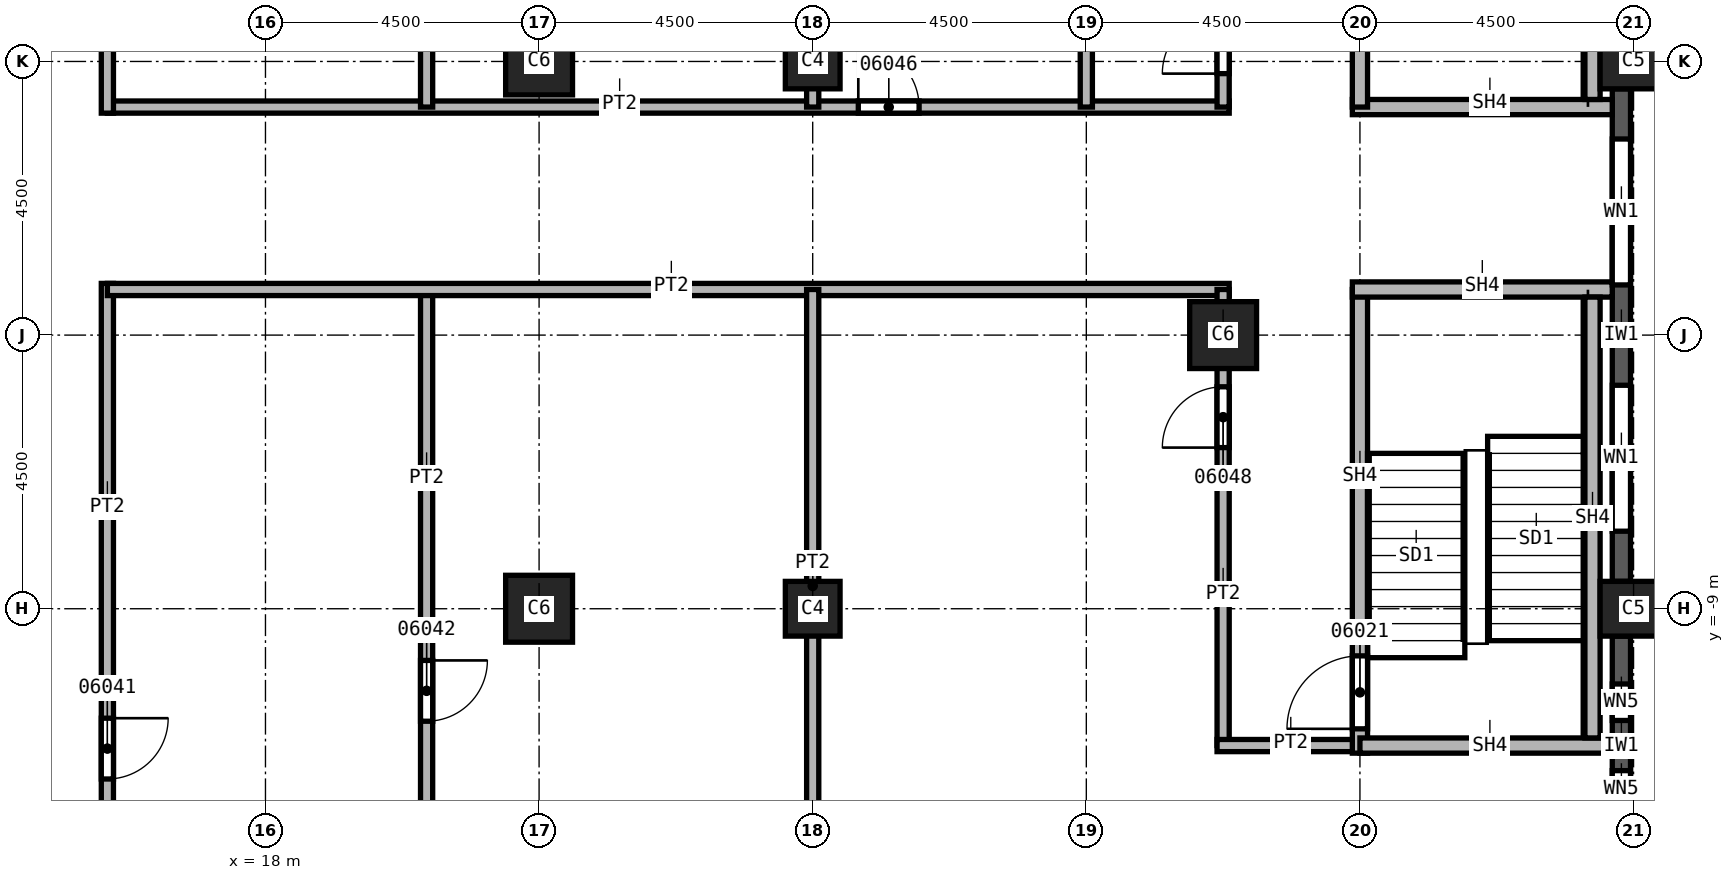
"""IFC4 building model, lengths in metres.
Left out: names, types, materials, properties, quantities, classifications, styles, units other than length and angle.
Written with IfcOpenShell. Run it as: python <this file> out.ifc"""

import sys

from ifc_helpers import new_model, si_unit, direction, frame, frame_2d, origin, origin_2d, place, context, subcontext, project, spatial, rectangle, extrude, element, fill, save


model = new_model("IFC4")
c1 = context("Model", 3, precision=1e-05, world=origin(), true_north=direction((0.0, 1.0)))
c2 = subcontext(c1, "Body", "Model", "MODEL_VIEW")
j1 = project(units=[si_unit("LENGTHUNIT", "METRE"), si_unit("PLANEANGLEUNIT", "RADIAN")], contexts=[c1])
p1 = place(None, origin())
s1 = spatial("IfcSite", under=j1, at=p1, CompositionType="ELEMENT")
p2 = place(p1, origin())
s2 = spatial("IfcBuilding", under=s1, at=p2, CompositionType="ELEMENT")
p3 = place(p2, frame((0.0, 0.0, 130.0)))
s3 = spatial("IfcBuildingStorey", under=s2, at=p3, CompositionType="ELEMENT", Elevation=130.0)
for number, where, z_axis, x_axis in (
    (1, (40.5, 0.0, 0.0), (0.0, 0.0, 1.0), (0.0, 1.0, 0.0)),
    (2, (40.5, -9.0, 0.0), (0.0, 0.0, 1.0), (0.0, 1.0, 0.0)),
):
    element("IfcColumn", number, at=place(p3, frame(where, z_axis=z_axis, x_axis=x_axis)), inside=s3, PredefinedType="COLUMN", context=c2, shape_type="SweptSolid", body=[
        extrude(rectangle(XDim=0.9, YDim=1.1, at=origin_2d()), origin(), (0.0, 0.0, 1.0), 3.7),
    ])
for number, where, z_axis, x_axis in (
    (3, (33.75, -4.5, 0.0), (0.0, 0.0, 1.0), (1.0, 0.0, 0.0)),
    (4, (22.5, 0.0, 0.0), (0.0, 0.0, 1.0), (1.0, 0.0, 0.0)),
    (5, (22.5, -9.0, 0.0), (0.0, 0.0, 1.0), (1.0, 0.0, 0.0)),
):
    element("IfcColumn", number, at=place(p3, frame(where, z_axis=z_axis, x_axis=x_axis)), inside=s3, PredefinedType="COLUMN", context=c2, shape_type="SweptSolid", body=[
        extrude(rectangle(XDim=1.1, YDim=1.1, at=origin_2d()), origin(), (0.0, 0.0, 1.0), 3.7),
    ])
for number, where, z_axis, x_axis in (
    (6, (27.0, 0.0, 0.0), (0.0, 0.0, 1.0), (1.0, 0.0, 0.0)),
    (7, (27.0, -9.0, 0.0), (0.0, 0.0, 1.0), (1.0, 0.0, 0.0)),
):
    element("IfcColumn", number, at=place(p3, frame(where, z_axis=z_axis, x_axis=x_axis)), inside=s3, PredefinedType="COLUMN", context=c2, shape_type="SweptSolid", body=[
        extrude(rectangle(XDim=0.9, YDim=0.9, at=origin_2d()), origin(), (0.0, 0.0, 1.0), 3.7),
    ])
p4 = place(p3, frame((40.3, -13.05, 0.0), z_axis=(0.0, 0.0, 1.0), x_axis=(0.0, 1.0, 0.0)))
e8 = element("IfcWall", 8, at=p4, inside=s3, PredefinedType="SOLIDWALL", context=c2, shape_type="SweptSolid", body=[
    extrude(rectangle(XDim=3.6, YDim=0.3, at=frame_2d((1.8, 0.0))), origin(), (0.0, 0.0, 1.0), 3.1),
])
p5 = place(p4, frame((0.788, 0.0, 0.8)))
e9 = element("IfcOpeningElement", 9, at=p5, cuts=e8, PredefinedType="OPENING", context=c2, shape_type="SweptSolid", body=[
    extrude(rectangle(XDim=0.6, YDim=1.95, at=frame_2d((0.3, 0.975))), frame((0.0, 0.15, 0.0), z_axis=(0.0, -1.0, 0.0), x_axis=(1.0, 0.0, 0.0)), (0.0, 0.0, 1.0), 0.3),
])
p6 = place(p4, frame((2.212, 0.0, 0.8)))
e10 = element("IfcOpeningElement", 10, at=p6, cuts=e8, PredefinedType="OPENING", context=c2, shape_type="SweptSolid", body=[
    extrude(rectangle(XDim=0.6, YDim=1.95, at=frame_2d((0.3, 0.975))), frame((0.0, 0.15, 0.0), z_axis=(0.0, -1.0, 0.0), x_axis=(1.0, 0.0, 0.0)), (0.0, 0.0, 1.0), 0.3),
])
p7 = place(p3, frame((40.3, -8.55, 0.0), z_axis=(0.0, 0.0, 1.0), x_axis=(0.0, 1.0, 0.0)))
e11 = element("IfcWall", 11, at=p7, inside=s3, PredefinedType="SOLIDWALL", context=c2, shape_type="SweptSolid", body=[
    extrude(rectangle(XDim=8.1, YDim=0.3, at=frame_2d((4.05, 0.0))), origin(), (0.0, 0.0, 1.0), 3.1),
])
p8 = place(p7, frame((0.825, 0.0, 0.8)))
e12 = element("IfcOpeningElement", 12, at=p8, cuts=e11, PredefinedType="OPENING", context=c2, shape_type="SweptSolid", body=[
    extrude(rectangle(XDim=2.4, YDim=1.95, at=frame_2d((1.2, 0.975))), frame((0.0, 0.15, 0.0), z_axis=(0.0, -1.0, 0.0), x_axis=(1.0, 0.0, 0.0)), (0.0, 0.0, 1.0), 0.3),
])
p9 = place(p7, frame((4.875, 0.0, 0.8)))
e13 = element("IfcOpeningElement", 13, at=p9, cuts=e11, PredefinedType="OPENING", context=c2, shape_type="SweptSolid", body=[
    extrude(rectangle(XDim=2.4, YDim=1.95, at=frame_2d((1.2, 0.975))), frame((0.0, 0.15, 0.0), z_axis=(0.0, -1.0, 0.0), x_axis=(1.0, 0.0, 0.0)), (0.0, 0.0, 1.0), 0.3),
])
p10 = place(p3, frame((15.4, -3.65, 0.0), z_axis=(0.0, 0.0, 1.0), x_axis=(0.0, -1.0, 0.0)))
e14 = element("IfcWall", 14, at=p10, inside=s3, PredefinedType="PARTITIONING", context=c2, shape_type="SweptSolid", body=[
    extrude(rectangle(XDim=19.6, YDim=0.2, at=frame_2d((9.8, 0.0))), origin(), (0.0, 0.0, 1.0), 3.7),
])
p11 = place(p10, frame((14.65, 0.0, 0.0)))
e15 = element("IfcOpeningElement", 15, at=p11, cuts=e14, PredefinedType="OPENING", context=c2, shape_type="SweptSolid", body=[
    extrude(rectangle(XDim=1.0, YDim=2.1, at=frame_2d((0.5, 1.05))), frame((0.0, 0.1, 0.0), z_axis=(0.0, -1.0, 0.0), x_axis=(1.0, 0.0, 0.0)), (0.0, 0.0, 1.0), 0.2),
])
p12 = place(p10, frame((10.0, 0.0, 0.0)))
e16 = element("IfcOpeningElement", 16, at=p12, cuts=e14, PredefinedType="OPENING", context=c2, shape_type="SweptSolid", body=[
    extrude(rectangle(XDim=1.0, YDim=2.1, at=frame_2d((0.5, 1.05))), frame((0.0, 0.1, 0.0), z_axis=(0.0, -1.0, 0.0), x_axis=(1.0, 0.0, 0.0)), (0.0, 0.0, 1.0), 0.2),
])
p13 = place(p10, frame((7.15, 0.0, 0.0)))
e17 = element("IfcOpeningElement", 17, at=p13, cuts=e14, PredefinedType="OPENING", context=c2, shape_type="SweptSolid", body=[
    extrude(rectangle(XDim=1.0, YDim=2.1, at=frame_2d((0.5, 1.05))), frame((0.0, 0.1, 0.0), z_axis=(0.0, -1.0, 0.0), x_axis=(1.0, 0.0, 0.0)), (0.0, 0.0, 1.0), 0.2),
])
p14 = place(p3, frame((15.4, -0.75, 0.0), z_axis=(0.0, 0.0, 1.0), x_axis=(1.0, 0.0, 0.0)))
e18 = element("IfcWall", 18, at=p14, inside=s3, PredefinedType="PARTITIONING", context=c2, shape_type="SweptSolid", body=[
    extrude(rectangle(XDim=18.45, YDim=0.2, at=frame_2d((9.225, 0.0))), origin(), (0.0, 0.0, 1.0), 3.7),
])
p15 = place(p14, frame((12.35, 0.0, 0.0)))
e19 = element("IfcOpeningElement", 19, at=p15, cuts=e18, PredefinedType="OPENING", context=c2, shape_type="SweptSolid", body=[
    extrude(rectangle(XDim=1.0, YDim=2.1, at=frame_2d((0.5, 1.05))), frame((0.0, 0.1, 0.0), z_axis=(0.0, -1.0, 0.0), x_axis=(1.0, 0.0, 0.0)), (0.0, 0.0, 1.0), 0.2),
])
p16 = place(p3, frame((15.4, 23.25, 0.0), z_axis=(0.0, 0.0, 1.0), x_axis=(0.0, -1.0, 0.0)))
e20 = element("IfcWall", 20, at=p16, inside=s3, PredefinedType="PARTITIONING", context=c2, shape_type="SweptSolid", body=[
    extrude(rectangle(XDim=24.1, YDim=0.2, at=frame_2d((12.05, 0.0))), origin(), (0.0, 0.0, 1.0), 3.7),
])
p17 = place(p16, frame((21.3, 0.0, 0.0)))
e21 = element("IfcOpeningElement", 21, at=p17, cuts=e20, PredefinedType="OPENING", context=c2, shape_type="SweptSolid", body=[
    extrude(rectangle(XDim=1.0, YDim=2.1, at=frame_2d((0.5, 1.05))), frame((0.0, 0.1, 0.0), z_axis=(0.0, -1.0, 0.0), x_axis=(1.0, 0.0, 0.0)), (0.0, 0.0, 1.0), 0.2),
])
p18 = place(p16, frame((12.45, 0.0, 0.0)))
e22 = element("IfcOpeningElement", 22, at=p18, cuts=e20, PredefinedType="OPENING", context=c2, shape_type="SweptSolid", body=[
    extrude(rectangle(XDim=1.0, YDim=2.1, at=frame_2d((0.5, 1.05))), frame((0.0, 0.1, 0.0), z_axis=(0.0, -1.0, 0.0), x_axis=(1.0, 0.0, 0.0)), (0.0, 0.0, 1.0), 0.2),
])
p19 = place(p16, frame((4.45, 0.0, 0.0)))
e23 = element("IfcOpeningElement", 23, at=p19, cuts=e20, PredefinedType="OPENING", context=c2, shape_type="SweptSolid", body=[
    extrude(rectangle(XDim=1.0, YDim=2.1, at=frame_2d((0.5, 1.05))), frame((0.0, 0.1, 0.0), z_axis=(0.0, -1.0, 0.0), x_axis=(1.0, 0.0, 0.0)), (0.0, 0.0, 1.0), 0.2),
])
p20 = place(p3, frame((20.65, -3.75, 0.0), z_axis=(0.0, 0.0, 1.0), x_axis=(0.0, -1.0, 0.0)))
e24 = element("IfcWall", 24, at=p20, inside=s3, PredefinedType="PARTITIONING", context=c2, shape_type="SweptSolid", body=[
    extrude(rectangle(XDim=9.75, YDim=0.2, at=frame_2d((4.875, 0.0))), origin(), (0.0, 0.0, 1.0), 3.7),
])
p21 = place(p20, frame((6.1, 0.0, 0.0)))
e25 = element("IfcOpeningElement", 25, at=p21, cuts=e24, PredefinedType="OPENING", context=c2, shape_type="SweptSolid", body=[
    extrude(rectangle(XDim=1.0, YDim=2.1, at=frame_2d((0.5, 1.05))), frame((0.0, 0.1, 0.0), z_axis=(0.0, -1.0, 0.0), x_axis=(1.0, 0.0, 0.0)), (0.0, 0.0, 1.0), 0.2),
])
p22 = place(p3, frame((20.65, 9.1, 0.0), z_axis=(0.0, 0.0, 1.0), x_axis=(0.0, -1.0, 0.0)))
e26 = element("IfcWall", 26, at=p22, inside=s3, PredefinedType="PARTITIONING", context=c2, shape_type="SweptSolid", body=[
    extrude(rectangle(XDim=9.85, YDim=0.2, at=frame_2d((4.925, 0.0))), origin(), (0.0, 0.0, 1.0), 3.7),
])
p23 = place(p22, frame((6.25, 0.0, 0.0)))
e27 = element("IfcOpeningElement", 27, at=p23, cuts=e26, PredefinedType="OPENING", context=c2, shape_type="SweptSolid", body=[
    extrude(rectangle(XDim=1.0, YDim=2.1, at=frame_2d((0.5, 1.05))), frame((0.0, 0.1, 0.0), z_axis=(0.0, -1.0, 0.0), x_axis=(1.0, 0.0, 0.0)), (0.0, 0.0, 1.0), 0.2),
])
p24 = place(p3, frame((33.85, -3.75, 0.0), z_axis=(0.0, 0.0, 1.0), x_axis=(-1.0, 0.0, 0.0)))
e28 = element("IfcWall", 28, at=p24, inside=s3, PredefinedType="PARTITIONING", context=c2, shape_type="SweptSolid", body=[
    extrude(rectangle(XDim=18.45, YDim=0.2, at=frame_2d((9.225, 0.0))), origin(), (0.0, 0.0, 1.0), 3.7),
])
p25 = place(p3, frame((27.0, -3.75, 0.0), z_axis=(0.0, 0.0, 1.0), x_axis=(0.0, -1.0, 0.0)))
e29 = element("IfcWall", 29, at=p25, inside=s3, PredefinedType="PARTITIONING", context=c2, shape_type="SweptSolid", body=[
    extrude(rectangle(XDim=13.7, YDim=0.2, at=frame_2d((6.85, 0.0))), origin(), (0.0, 0.0, 1.0), 3.7),
])
for number, where, z_axis, x_axis in (
    (30, (27.0, 17.45, 0.0), (0.0, 0.0, 1.0), (0.0, -1.0, 0.0)),
    (31, (31.5, 17.45, 0.0), (0.0, 0.0, 1.0), (0.0, -1.0, 0.0)),
):
    element("IfcWall", number, at=place(p3, frame(where, z_axis=z_axis, x_axis=x_axis)), inside=s3, PredefinedType="PARTITIONING", context=c2, shape_type="SweptSolid", body=[
        extrude(rectangle(XDim=18.2, YDim=0.2, at=frame_2d((9.1, 0.0))), origin(), (0.0, 0.0, 1.0), 3.7),
    ])
p26 = place(p3, frame((33.75, -11.25, 0.0), z_axis=(0.0, 0.0, 1.0), x_axis=(0.0, 1.0, 0.0)))
e32 = element("IfcWall", 32, at=p26, inside=s3, PredefinedType="PARTITIONING", context=c2, shape_type="SweptSolid", body=[
    extrude(rectangle(XDim=7.5, YDim=0.2, at=frame_2d((3.75, 0.0))), origin(), (0.0, 0.0, 1.0), 3.7),
])
p27 = place(p26, frame((4.9, 0.0, 0.0)))
e33 = element("IfcOpeningElement", 33, at=p27, cuts=e32, PredefinedType="OPENING", context=c2, shape_type="SweptSolid", body=[
    extrude(rectangle(XDim=1.0, YDim=2.1, at=frame_2d((0.5, 1.05))), frame((0.0, 0.1, 0.0), z_axis=(0.0, -1.0, 0.0), x_axis=(1.0, 0.0, 0.0)), (0.0, 0.0, 1.0), 0.2),
])
p28 = place(p3, frame((33.75, -0.75, 0.0), z_axis=(0.0, 0.0, 1.0), x_axis=(0.0, 1.0, 0.0)))
e34 = element("IfcWall", 34, at=p28, inside=s3, PredefinedType="PARTITIONING", context=c2, shape_type="SweptSolid", body=[
    extrude(rectangle(XDim=7.5, YDim=0.2, at=frame_2d((3.75, 0.0))), origin(), (0.0, 0.0, 1.0), 3.7),
])
p29 = place(p28, frame((0.55, 0.0, 0.0)))
e35 = element("IfcOpeningElement", 35, at=p29, cuts=e34, PredefinedType="OPENING", context=c2, shape_type="SweptSolid", body=[
    extrude(rectangle(XDim=1.0, YDim=2.1, at=frame_2d((0.5, 1.05))), frame((0.0, 0.1, 0.0), z_axis=(0.0, -1.0, 0.0), x_axis=(1.0, 0.0, 0.0)), (0.0, 0.0, 1.0), 0.2),
])
p30 = place(p3, frame((36.0, -11.25, 0.0), z_axis=(0.0, 0.0, 1.0), x_axis=(-1.0, 0.0, 0.0)))
e36 = element("IfcWall", 36, at=p30, inside=s3, PredefinedType="PARTITIONING", context=c2, shape_type="SweptSolid", body=[
    extrude(rectangle(XDim=2.35, YDim=0.2, at=frame_2d((1.175, 0.0))), origin(), (0.0, 0.0, 1.0), 3.7),
])
p31 = place(p3, frame((35.875, -0.75, 0.0), z_axis=(0.0, 0.0, 1.0), x_axis=(1.0, 0.0, 0.0)))
e37 = element("IfcWall", 37, at=p31, inside=s3, PredefinedType="SOLIDWALL", context=c2, shape_type="SweptSolid", body=[
    extrude(rectangle(XDim=4.275, YDim=0.25, at=frame_2d((2.137, 0.0))), origin(), (0.0, 0.0, 1.0), 3.7),
])
p32 = place(p3, frame((36.0, -11.375, 0.0), z_axis=(0.0, 0.0, 1.0), x_axis=(0.0, 1.0, 0.0)))
e38 = element("IfcWall", 38, at=p32, inside=s3, PredefinedType="SOLIDWALL", context=c2, shape_type="SweptSolid", body=[
    extrude(rectangle(XDim=7.625, YDim=0.25, at=frame_2d((3.812, 0.0))), origin(), (0.0, 0.0, 1.0), 3.7),
])
p33 = place(p32, frame((0.4, 0.0, 0.0)))
e39 = element("IfcOpeningElement", 39, at=p33, cuts=e38, PredefinedType="OPENING", context=c2, shape_type="SweptSolid", body=[
    extrude(rectangle(XDim=1.2, YDim=2.1, at=frame_2d((0.6, 1.05))), frame((0.0, 0.125, 0.0), z_axis=(0.0, -1.0, 0.0), x_axis=(1.0, 0.0, 0.0)), (0.0, 0.0, 1.0), 0.25),
])
p34 = place(p3, frame((36.0, -0.75, 0.0), z_axis=(0.0, 0.0, 1.0), x_axis=(0.0, 1.0, 0.0)))
e40 = element("IfcWall", 40, at=p34, inside=s3, PredefinedType="SOLIDWALL", context=c2, shape_type="SweptSolid", body=[
    extrude(rectangle(XDim=7.625, YDim=0.25, at=frame_2d((3.812, 0.0))), origin(), (0.0, 0.0, 1.0), 3.7),
])
p35 = place(p34, frame((5.95, 0.0, 0.0)))
e41 = element("IfcOpeningElement", 41, at=p35, cuts=e40, PredefinedType="OPENING", context=c2, shape_type="SweptSolid", body=[
    extrude(rectangle(XDim=1.2, YDim=2.1, at=frame_2d((0.6, 1.05))), frame((0.0, 0.125, 0.0), z_axis=(0.0, -1.0, 0.0), x_axis=(1.0, 0.0, 0.0)), (0.0, 0.0, 1.0), 0.25),
])
p36 = place(p3, frame((40.15, -11.25, 0.0), z_axis=(0.0, 0.0, 1.0), x_axis=(-1.0, 0.0, 0.0)))
e42 = element("IfcWall", 42, at=p36, inside=s3, PredefinedType="SOLIDWALL", context=c2, shape_type="SweptSolid", body=[
    extrude(rectangle(XDim=4.15, YDim=0.25, at=frame_2d((2.075, 0.0))), origin(), (0.0, 0.0, 1.0), 3.7),
])
p37 = place(p3, frame((40.15, -3.75, 0.0), z_axis=(0.0, 0.0, 1.0), x_axis=(-1.0, 0.0, 0.0)))
e43 = element("IfcWall", 43, at=p37, inside=s3, PredefinedType="SOLIDWALL", context=c2, shape_type="SweptSolid", body=[
    extrude(rectangle(XDim=4.275, YDim=0.25, at=frame_2d((2.137, 0.0))), origin(), (0.0, 0.0, 1.0), 3.7),
])
for number, where, z_axis, x_axis in (
    (44, (39.825, -11.125, 0.0), (0.0, 0.0, 1.0), (0.0, 1.0, 0.0)),
    (45, (39.825, -0.625, 0.0), (0.0, 0.0, 1.0), (0.0, 1.0, 0.0)),
):
    element("IfcWall", number, at=place(p3, frame(where, z_axis=z_axis, x_axis=x_axis)), inside=s3, PredefinedType="SOLIDWALL", context=c2, shape_type="SweptSolid", body=[
        extrude(rectangle(XDim=7.25, YDim=0.25, at=frame_2d((3.625, 0.0))), origin(), (0.0, 0.0, 1.0), 3.7),
    ])
p38 = place(p8, origin())
e46 = element("IfcWindow", 46, at=p38, inside=s3, PartitioningType="SINGLE_PANEL", PredefinedType="WINDOW", context=c2, shape_type="SweptSolid", body=[
    extrude(rectangle(XDim=2.4, YDim=1.95, at=frame_2d((1.2, 0.975))), frame((0.0, 0.03, 0.0), z_axis=(0.0, -1.0, 0.0), x_axis=(1.0, 0.0, 0.0)), (0.0, 0.0, 1.0), 0.06),
])
fill(e12, e46)
p39 = place(p9, origin())
e47 = element("IfcWindow", 47, at=p39, inside=s3, PartitioningType="SINGLE_PANEL", PredefinedType="WINDOW", context=c2, shape_type="SweptSolid", body=[
    extrude(rectangle(XDim=2.4, YDim=1.95, at=frame_2d((1.2, 0.975))), frame((0.0, 0.03, 0.0), z_axis=(0.0, -1.0, 0.0), x_axis=(1.0, 0.0, 0.0)), (0.0, 0.0, 1.0), 0.06),
])
fill(e13, e47)
p40 = place(p33, origin())
e48 = element("IfcDoor", 48, at=p40, inside=s3, OperationType="SINGLE_SWING_RIGHT", PredefinedType="DOOR", context=c2, shape_type="SweptSolid", body=[
    extrude(rectangle(XDim=1.2, YDim=2.1, at=frame_2d((0.6, 1.05))), frame((0.0, 0.025, 0.0), z_axis=(0.0, -1.0, 0.0), x_axis=(1.0, 0.0, 0.0)), (0.0, 0.0, 1.0), 0.05),
])
fill(e39, e48)
p41 = place(p13, origin())
e49 = element("IfcDoor", 49, at=p41, inside=s3, OperationType="SINGLE_SWING_RIGHT", PredefinedType="DOOR", context=c2, shape_type="SweptSolid", body=[
    extrude(rectangle(XDim=1.0, YDim=2.1, at=frame_2d((0.5, 1.05))), frame((0.0, 0.025, 0.0), z_axis=(0.0, -1.0, 0.0), x_axis=(1.0, 0.0, 0.0)), (0.0, 0.0, 1.0), 0.05),
])
fill(e17, e49)
p42 = place(p21, origin())
e50 = element("IfcDoor", 50, at=p42, inside=s3, OperationType="SINGLE_SWING_LEFT", PredefinedType="DOOR", context=c2, shape_type="SweptSolid", body=[
    extrude(rectangle(XDim=1.0, YDim=2.1, at=frame_2d((0.5, 1.05))), frame((0.0, 0.025, 0.0), z_axis=(0.0, -1.0, 0.0), x_axis=(1.0, 0.0, 0.0)), (0.0, 0.0, 1.0), 0.05),
])
fill(e25, e50)
p43 = place(p15, origin())
e51 = element("IfcDoor", 51, at=p43, inside=s3, OperationType="SINGLE_SWING_LEFT", PredefinedType="DOOR", context=c2, shape_type="SweptSolid", body=[
    extrude(rectangle(XDim=1.0, YDim=2.1, at=frame_2d((0.5, 1.05))), frame((0.0, 0.025, 0.0), z_axis=(0.0, -1.0, 0.0), x_axis=(1.0, 0.0, 0.0)), (0.0, 0.0, 1.0), 0.05),
])
fill(e19, e51)
p44 = place(p29, origin())
e52 = element("IfcDoor", 52, at=p44, inside=s3, OperationType="SINGLE_SWING_RIGHT", PredefinedType="DOOR", context=c2, shape_type="SweptSolid", body=[
    extrude(rectangle(XDim=1.0, YDim=2.1, at=frame_2d((0.5, 1.05))), frame((0.0, 0.025, 0.0), z_axis=(0.0, -1.0, 0.0), x_axis=(1.0, 0.0, 0.0)), (0.0, 0.0, 1.0), 0.05),
])
fill(e35, e52)
p45 = place(p27, origin())
e53 = element("IfcDoor", 53, at=p45, inside=s3, OperationType="SINGLE_SWING_LEFT", PredefinedType="DOOR", context=c2, shape_type="SweptSolid", body=[
    extrude(rectangle(XDim=1.0, YDim=2.1, at=frame_2d((0.5, 1.05))), frame((0.0, 0.025, 0.0), z_axis=(0.0, -1.0, 0.0), x_axis=(1.0, 0.0, 0.0)), (0.0, 0.0, 1.0), 0.05),
])
fill(e33, e53)
p46 = place(p5, origin())
e54 = element("IfcWindow", 54, at=p46, inside=s3, PartitioningType="SINGLE_PANEL", PredefinedType="WINDOW", context=c2, shape_type="SweptSolid", body=[
    extrude(rectangle(XDim=0.6, YDim=1.95, at=frame_2d((0.3, 0.975))), frame((0.0, 0.03, 0.0), z_axis=(0.0, -1.0, 0.0), x_axis=(1.0, 0.0, 0.0)), (0.0, 0.0, 1.0), 0.06),
])
fill(e9, e54)
p47 = place(p6, origin())
e55 = element("IfcWindow", 55, at=p47, inside=s3, PartitioningType="SINGLE_PANEL", PredefinedType="WINDOW", context=c2, shape_type="SweptSolid", body=[
    extrude(rectangle(XDim=0.6, YDim=1.95, at=frame_2d((0.3, 0.975))), frame((0.0, 0.03, 0.0), z_axis=(0.0, -1.0, 0.0), x_axis=(1.0, 0.0, 0.0)), (0.0, 0.0, 1.0), 0.06),
])
fill(e10, e55)
save(model, sys.argv[1])
